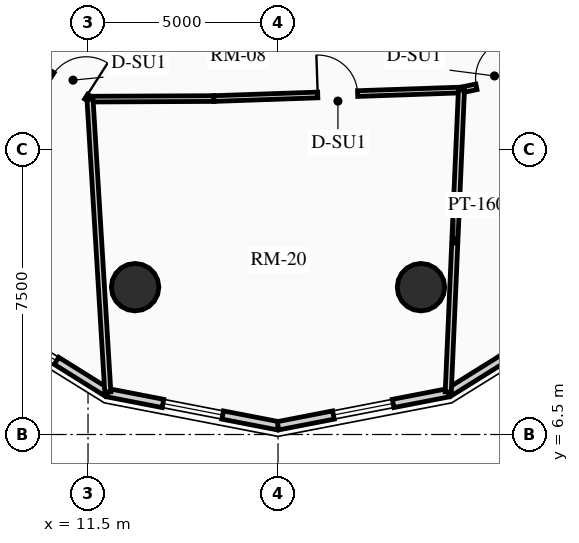
"""IFC4 building model, lengths in metres.
Left out: names, types, materials, properties, quantities, classifications, styles, units other than length and angle.
Written with IfcOpenShell. Run it as: python <this file> out.ifc"""

import sys

from ifc_helpers import new_model, si_unit, direction, frame, frame_2d, origin, origin_2d, place, context, subcontext, project, spatial, rectangle, circle, extrude, source, transform, mapped, element, fill, save


model = new_model("IFC4")
c1 = context("Model", 3, precision=1e-05, world=origin(), true_north=direction((0.0, 1.0)))
c2 = subcontext(c1, "Body", "Model", "MODEL_VIEW")
j1 = project(units=[si_unit("LENGTHUNIT", "METRE"), si_unit("PLANEANGLEUNIT", "RADIAN")], contexts=[c1])
p1 = place(None, origin())
s1 = spatial("IfcSite", under=j1, at=p1, CompositionType="ELEMENT")
p2 = place(p1, origin())
s2 = spatial("IfcBuilding", under=s1, at=p2, CompositionType="ELEMENT")
p3 = place(p2, frame((0.0, 0.0, 157.42)))
s3 = spatial("IfcBuildingStorey", under=s2, at=p3, CompositionType="ELEMENT", Elevation=157.42)
for number, where, z_axis, x_axis in (
    (1, (12.739, 10.377, 0.0), (0.0, 0.0, 1.0), (1.0, 0.0, 0.0)),
    (2, (20.261, 10.377, 0.0), (0.0, 0.0, 1.0), (1.0, 0.0, 0.0)),
):
    element("IfcColumn", number, at=place(p3, frame(where, z_axis=z_axis, x_axis=x_axis)), inside=s3, PredefinedType="USERDEFINED", context=c2, shape_type="SweptSolid", body=[
        extrude(circle(Radius=0.625, at=origin_2d()), origin(), (0.0, 0.0, 1.0), 2.91),
    ])
p4 = place(p3, frame((12.015, 7.6, 0.0), z_axis=(0.0, 0.0, 1.0), x_axis=(-0.848452391194, 0.529271707044, 0.0)))
e3 = element("IfcWall", 3, at=p4, inside=s3, PredefinedType="SOLIDWALL", context=c2, shape_type="SweptSolid", body=[
    extrude(rectangle(XDim=4.769, YDim=0.22, at=frame_2d((2.385, 0.0))), origin(), (0.0, 0.0, 1.0), 2.245),
])
m1 = source(origin(), c2, "Body", "SweptSolid", [
    extrude(rectangle(XDim=1.6, YDim=1.3, at=frame_2d((0.8, 0.65))), frame((0.0, 0.12, 0.0), z_axis=(0.0, -1.0, 0.0), x_axis=(1.0, 0.0, 0.0)), (0.0, 0.0, 1.0), 0.24),
])
p5 = place(p4, frame((1.585, 0.0, 0.65)))
e4 = element("IfcOpeningElement", 4, at=p5, cuts=e3, PredefinedType="OPENING", context=c2, shape_type="MappedRepresentation", body=[
    mapped(m1, transform((0.0, 0.0, 0.0), x_axis=(1.0, 0.0, 0.0), y_axis=(0.0, 1.0, 0.0), z_axis=(0.0, 0.0, 1.0), scale=1.0)),
])
p6 = place(p3, frame((16.5, 6.73, 0.0), z_axis=(0.0, 0.0, 1.0), x_axis=(-0.981718699963, 0.190337579429, 0.0)))
e5 = element("IfcWall", 5, at=p6, inside=s3, PredefinedType="SOLIDWALL", context=c2, shape_type="SweptSolid", body=[
    extrude(rectangle(XDim=4.569, YDim=0.22, at=frame_2d((2.284, 0.0))), origin(), (0.0, 0.0, 1.0), 2.245),
])
p7 = place(p6, frame((1.484, 0.0, 0.65)))
e6 = element("IfcOpeningElement", 6, at=p7, cuts=e5, PredefinedType="OPENING", context=c2, shape_type="MappedRepresentation", body=[
    mapped(m1, transform((0.0, 0.0, 0.0), x_axis=(1.0, 0.0, 0.0), y_axis=(0.0, 1.0, 0.0), z_axis=(0.0, 0.0, 1.0), scale=1.0)),
])
p8 = place(p3, frame((20.985, 7.6, 0.0), z_axis=(0.0, 0.0, 1.0), x_axis=(-0.981718699963, -0.190337579429, 0.0)))
e7 = element("IfcWall", 7, at=p8, inside=s3, PredefinedType="SOLIDWALL", context=c2, shape_type="SweptSolid", body=[
    extrude(rectangle(XDim=4.569, YDim=0.22, at=frame_2d((2.284, 0.0))), origin(), (0.0, 0.0, 1.0), 2.245),
])
p9 = place(p8, frame((1.484, 0.0, 0.65)))
e8 = element("IfcOpeningElement", 8, at=p9, cuts=e7, PredefinedType="OPENING", context=c2, shape_type="MappedRepresentation", body=[
    mapped(m1, transform((0.0, 0.0, 0.0), x_axis=(1.0, 0.0, 0.0), y_axis=(0.0, 1.0, 0.0), z_axis=(0.0, 0.0, 1.0), scale=1.0)),
])
p10 = place(p3, frame((25.032, 10.124, 0.0), z_axis=(0.0, 0.0, 1.0), x_axis=(-0.848452391194, -0.529271707044, 0.0)))
e9 = element("IfcWall", 9, at=p10, inside=s3, PredefinedType="SOLIDWALL", context=c2, shape_type="SweptSolid", body=[
    extrude(rectangle(XDim=4.769, YDim=0.22, at=frame_2d((2.385, 0.0))), origin(), (0.0, 0.0, 1.0), 2.245),
])
p11 = place(p3, frame((10.237, 16.168, 0.0), z_axis=(0.0, 0.0, 1.0), x_axis=(0.842061223587, -0.53938195718, 0.0)))
e10 = element("IfcWall", 10, at=p11, inside=s3, PredefinedType="PARTITIONING", context=c2, shape_type="SweptSolid", body=[
    extrude(rectangle(XDim=1.562, YDim=0.15, at=frame_2d((0.781, 0.0))), origin(), (0.0, 0.0, 1.0), 2.245),
])
m2 = source(origin(), c2, "Body", "SweptSolid", [
    extrude(rectangle(XDim=1.05, YDim=2.015, at=frame_2d((0.525, 1.007))), frame((0.0, 0.085, 0.0), z_axis=(0.0, -1.0, 0.0), x_axis=(1.0, 0.0, 0.0)), (0.0, 0.0, 1.0), 0.17),
])
p12 = place(p11, frame((0.392, 0.0, 0.0)))
e11 = element("IfcOpeningElement", 11, at=p12, cuts=e10, PredefinedType="OPENING", context=c2, shape_type="MappedRepresentation", body=[
    mapped(m2, transform((0.0, 0.0, 0.0), x_axis=(1.0, 0.0, 0.0), y_axis=(0.0, 1.0, 0.0), z_axis=(0.0, 0.0, 1.0), scale=1.0)),
])
p13 = place(p3, frame((11.552, 15.326, 0.0), z_axis=(0.0, 0.0, 1.0), x_axis=(0.999989573465, 0.004566504266, 0.0)))
e12 = element("IfcWall", 12, at=p13, inside=s3, PredefinedType="PARTITIONING", context=c2, shape_type="SweptSolid", body=[
    extrude(rectangle(XDim=3.261, YDim=0.15, at=frame_2d((1.631, 0.0))), origin(), (0.0, 0.0, 1.0), 2.245),
])
p14 = place(p3, frame((14.813, 15.341, 0.0), z_axis=(0.0, 0.0, 1.0), x_axis=(0.999402077819, 0.034575813105, 0.0)))
e13 = element("IfcWall", 13, at=p14, inside=s3, PredefinedType="PARTITIONING", context=c2, shape_type="SweptSolid", body=[
    extrude(rectangle(XDim=6.517, YDim=0.15, at=frame_2d((3.259, 0.0))), origin(), (0.0, 0.0, 1.0), 2.245),
])
p15 = place(p14, frame((2.734, 0.0, 0.0)))
e14 = element("IfcOpeningElement", 14, at=p15, cuts=e13, PredefinedType="OPENING", context=c2, shape_type="MappedRepresentation", body=[
    mapped(m2, transform((0.0, 0.0, 0.0), x_axis=(1.0, 0.0, 0.0), y_axis=(0.0, 1.0, 0.0), z_axis=(0.0, 0.0, 1.0), scale=1.0)),
])
p16 = place(p3, frame((21.326, 15.566, 0.0), z_axis=(0.0, 0.0, 1.0), x_axis=(0.977908238308, 0.209034632176, 0.0)))
e15 = element("IfcWall", 15, at=p16, inside=s3, PredefinedType="PARTITIONING", context=c2, shape_type="SweptSolid", body=[
    extrude(rectangle(XDim=1.855, YDim=0.15, at=frame_2d((0.927, 0.0))), origin(), (0.0, 0.0, 1.0), 2.245),
])
p17 = place(p16, frame((0.402, 0.0, 0.0)))
e16 = element("IfcOpeningElement", 16, at=p17, cuts=e15, PredefinedType="OPENING", context=c2, shape_type="MappedRepresentation", body=[
    mapped(m2, transform((0.0, 0.0, 0.0), x_axis=(1.0, 0.0, 0.0), y_axis=(0.0, 1.0, 0.0), z_axis=(0.0, 0.0, 1.0), scale=1.0)),
])
p18 = place(p3, frame((11.552, 15.326, 0.0), z_axis=(0.0, 0.0, 1.0), x_axis=(0.060740403573, -0.998153597085, 0.0)))
e17 = element("IfcWall", 17, at=p18, inside=s3, PredefinedType="PARTITIONING", context=c2, shape_type="SweptSolid", body=[
    extrude(rectangle(XDim=7.721, YDim=0.16, at=frame_2d((3.861, 0.0))), origin(), (0.0, 0.0, 1.0), 2.245),
])
p19 = place(p3, frame((21.326, 15.566, 0.0), z_axis=(0.0, 0.0, 1.0), x_axis=(-0.043642330618, -0.999047219594, 0.0)))
e18 = element("IfcWall", 18, at=p19, inside=s3, PredefinedType="PARTITIONING", context=c2, shape_type="SweptSolid", body=[
    extrude(rectangle(XDim=7.955, YDim=0.16, at=frame_2d((3.978, 0.0))), origin(), (0.0, 0.0, 1.0), 2.245),
])
m3 = source(origin(), c2, "Body", "SweptSolid", [
    extrude(rectangle(XDim=1.6, YDim=1.3, at=frame_2d((0.8, 0.65))), frame((0.0, 0.03, 0.0), z_axis=(0.0, -1.0, 0.0), x_axis=(1.0, 0.0, 0.0)), (0.0, 0.0, 1.0), 0.06),
])
p20 = place(p5, origin())
e19 = element("IfcWindow", 19, at=p20, inside=s3, PartitioningType="SINGLE_PANEL", PredefinedType="WINDOW", context=c2, shape_type="MappedRepresentation", body=[
    mapped(m3, transform((0.0, 0.0, 0.0), x_axis=(1.0, 0.0, 0.0), y_axis=(0.0, 1.0, 0.0), z_axis=(0.0, 0.0, 1.0), scale=1.0)),
])
fill(e4, e19)
p21 = place(p7, origin())
e20 = element("IfcWindow", 20, at=p21, inside=s3, PartitioningType="SINGLE_PANEL", PredefinedType="WINDOW", context=c2, shape_type="MappedRepresentation", body=[
    mapped(m3, transform((0.0, 0.0, 0.0), x_axis=(1.0, 0.0, 0.0), y_axis=(0.0, 1.0, 0.0), z_axis=(0.0, 0.0, 1.0), scale=1.0)),
])
fill(e6, e20)
p22 = place(p9, origin())
e21 = element("IfcWindow", 21, at=p22, inside=s3, PartitioningType="SINGLE_PANEL", PredefinedType="WINDOW", context=c2, shape_type="MappedRepresentation", body=[
    mapped(m3, transform((0.0, 0.0, 0.0), x_axis=(1.0, 0.0, 0.0), y_axis=(0.0, 1.0, 0.0), z_axis=(0.0, 0.0, 1.0), scale=1.0)),
])
fill(e8, e21)
m4 = source(origin(), c2, "Body", "SweptSolid", [
    extrude(rectangle(XDim=1.05, YDim=2.015, at=frame_2d((0.525, 1.007))), frame((0.0, 0.025, 0.0), z_axis=(0.0, -1.0, 0.0), x_axis=(1.0, 0.0, 0.0)), (0.0, 0.0, 1.0), 0.05),
])
p23 = place(p12, origin())
e22 = element("IfcDoor", 22, at=p23, inside=s3, OperationType="SINGLE_SWING_RIGHT", PredefinedType="DOOR", context=c2, shape_type="MappedRepresentation", body=[
    mapped(m4, transform((0.0, 0.0, 0.0), x_axis=(1.0, 0.0, 0.0), y_axis=(0.0, 1.0, 0.0), z_axis=(0.0, 0.0, 1.0), scale=1.0)),
])
fill(e11, e22)
p24 = place(p15, origin())
e23 = element("IfcDoor", 23, at=p24, inside=s3, OperationType="SINGLE_SWING_LEFT", PredefinedType="DOOR", context=c2, shape_type="MappedRepresentation", body=[
    mapped(m4, transform((0.0, 0.0, 0.0), x_axis=(1.0, 0.0, 0.0), y_axis=(0.0, 1.0, 0.0), z_axis=(0.0, 0.0, 1.0), scale=1.0)),
])
fill(e14, e23)
p25 = place(p17, origin())
e24 = element("IfcDoor", 24, at=p25, inside=s3, OperationType="SINGLE_SWING_RIGHT", PredefinedType="DOOR", context=c2, shape_type="MappedRepresentation", body=[
    mapped(m4, transform((0.0, 0.0, 0.0), x_axis=(1.0, 0.0, 0.0), y_axis=(0.0, 1.0, 0.0), z_axis=(0.0, 0.0, 1.0), scale=1.0)),
])
fill(e16, e24)
save(model, sys.argv[1])
